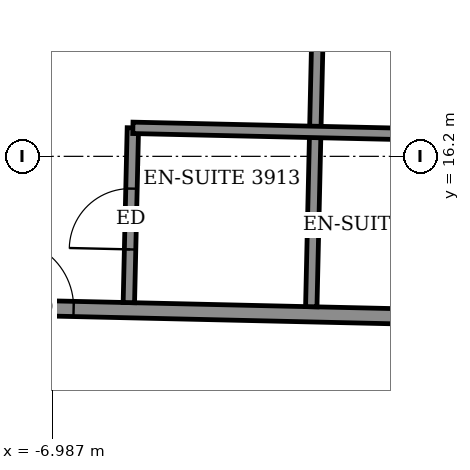
"""IFC4 building model, lengths in metres.
Left out: names, types, materials, properties, quantities, classifications, styles, units other than length and angle.
Written with IfcOpenShell. Run it as: python <this file> out.ifc"""

import sys

from ifc_helpers import new_model, si_unit, direction, frame, frame_2d, origin, place, context, subcontext, project, spatial, rectangle, extrude, element, fill, save


model = new_model("IFC4")
c1 = context("Model", 3, precision=1e-05, world=origin(), true_north=direction((0.0, 1.0)))
c2 = subcontext(c1, "Body", "Model", "MODEL_VIEW")
j1 = project(units=[si_unit("LENGTHUNIT", "METRE"), si_unit("PLANEANGLEUNIT", "RADIAN")], contexts=[c1])
p1 = place(None, origin())
s1 = spatial("IfcSite", under=j1, at=p1, CompositionType="ELEMENT")
p2 = place(p1, origin())
s2 = spatial("IfcBuilding", under=s1, at=p2, CompositionType="ELEMENT")
p3 = place(p2, frame((0.0, 0.0, 156.3)))
s3 = spatial("IfcBuildingStorey", under=s2, at=p3, CompositionType="ELEMENT", Elevation=156.3)
p4 = place(p3, frame((-21.279, 14.523, 0.0), z_axis=(0.0, 0.0, 1.0), x_axis=(0.999742669174, -0.02268469602, 0.0)))
e1 = element("IfcWall", 1, at=p4, inside=s3, PredefinedType="PARTITIONING", context=c2, shape_type="SweptSolid", body=[
    extrude(rectangle(XDim=40.639, YDim=0.2, at=frame_2d((20.319, 0.0))), origin(), (0.0, 0.0, 1.0), 3.05),
])
p5 = place(p4, frame((37.65, 0.0, 0.0)))
e2 = element("IfcOpeningElement", 2, at=p5, cuts=e1, PredefinedType="OPENING", context=c2, shape_type="SweptSolid", body=[
    extrude(rectangle(XDim=0.9, YDim=2.1, at=frame_2d((0.45, 1.05))), frame((0.0, 0.11, 0.0), z_axis=(0.0, -1.0, 0.0), x_axis=(1.0, 0.0, 0.0)), (0.0, 0.0, 1.0), 0.22),
])
p6 = place(p4, frame((32.775, 0.0, 0.0)))
e3 = element("IfcOpeningElement", 3, at=p6, cuts=e1, PredefinedType="OPENING", context=c2, shape_type="SweptSolid", body=[
    extrude(rectangle(XDim=0.9, YDim=2.1, at=frame_2d((0.45, 1.05))), frame((0.0, 0.11, 0.0), z_axis=(0.0, -1.0, 0.0), x_axis=(1.0, 0.0, 0.0)), (0.0, 0.0, 1.0), 0.22),
])
p7 = place(p4, frame((30.4, 0.0, 0.0)))
e4 = element("IfcOpeningElement", 4, at=p7, cuts=e1, PredefinedType="OPENING", context=c2, shape_type="SweptSolid", body=[
    extrude(rectangle(XDim=0.9, YDim=2.1, at=frame_2d((0.45, 1.05))), frame((0.0, 0.11, 0.0), z_axis=(0.0, -1.0, 0.0), x_axis=(1.0, 0.0, 0.0)), (0.0, 0.0, 1.0), 0.22),
])
p8 = place(p4, frame((23.225, 0.0, 0.0)))
e5 = element("IfcOpeningElement", 5, at=p8, cuts=e1, PredefinedType="OPENING", context=c2, shape_type="SweptSolid", body=[
    extrude(rectangle(XDim=0.9, YDim=2.1, at=frame_2d((0.45, 1.05))), frame((0.0, 0.11, 0.0), z_axis=(0.0, -1.0, 0.0), x_axis=(1.0, 0.0, 0.0)), (0.0, 0.0, 1.0), 0.22),
])
p9 = place(p4, frame((20.85, 0.0, 0.0)))
e6 = element("IfcOpeningElement", 6, at=p9, cuts=e1, PredefinedType="OPENING", context=c2, shape_type="SweptSolid", body=[
    extrude(rectangle(XDim=0.9, YDim=2.1, at=frame_2d((0.45, 1.05))), frame((0.0, 0.11, 0.0), z_axis=(0.0, -1.0, 0.0), x_axis=(1.0, 0.0, 0.0)), (0.0, 0.0, 1.0), 0.22),
])
p10 = place(p4, frame((13.675, 0.0, 0.0)))
e7 = element("IfcOpeningElement", 7, at=p10, cuts=e1, PredefinedType="OPENING", context=c2, shape_type="SweptSolid", body=[
    extrude(rectangle(XDim=0.9, YDim=2.1, at=frame_2d((0.45, 1.05))), frame((0.0, 0.11, 0.0), z_axis=(0.0, -1.0, 0.0), x_axis=(1.0, 0.0, 0.0)), (0.0, 0.0, 1.0), 0.22),
])
p11 = place(p4, frame((11.325, 0.0, 0.0)))
e8 = element("IfcOpeningElement", 8, at=p11, cuts=e1, PredefinedType="OPENING", context=c2, shape_type="SweptSolid", body=[
    extrude(rectangle(XDim=0.9, YDim=2.1, at=frame_2d((0.45, 1.05))), frame((0.0, 0.11, 0.0), z_axis=(0.0, -1.0, 0.0), x_axis=(1.0, 0.0, 0.0)), (0.0, 0.0, 1.0), 0.22),
])
p12 = place(p4, frame((1.6, 0.0, 0.0)))
e9 = element("IfcOpeningElement", 9, at=p12, cuts=e1, PredefinedType="OPENING", context=c2, shape_type="SweptSolid", body=[
    extrude(rectangle(XDim=1.0, YDim=2.1, at=frame_2d((0.5, 1.05))), frame((0.0, 0.11, 0.0), z_axis=(0.0, -1.0, 0.0), x_axis=(1.0, 0.0, 0.0)), (0.0, 0.0, 1.0), 0.22),
])
p13 = place(p4, frame((6.55, 0.0, 0.0)))
e10 = element("IfcOpeningElement", 10, at=p13, cuts=e1, PredefinedType="OPENING", context=c2, shape_type="SweptSolid", body=[
    extrude(rectangle(XDim=0.9, YDim=2.1, at=frame_2d((0.45, 1.05))), frame((0.0, 0.11, 0.0), z_axis=(0.0, -1.0, 0.0), x_axis=(1.0, 0.0, 0.0)), (0.0, 0.0, 1.0), 0.22),
])
p14 = place(p3, frame((-5.981, 14.276, 0.0), z_axis=(0.0, 0.0, 1.0), x_axis=(0.023037316498, 0.999734605807, 0.0)))
e11 = element("IfcWall", 11, at=p14, inside=s3, PredefinedType="PARTITIONING", context=c2, shape_type="SweptSolid", body=[
    extrude(rectangle(XDim=2.3, YDim=0.15, at=frame_2d((1.15, 0.0))), origin(), (0.0, 0.0, 1.0), 3.05),
])
p15 = place(p14, frame((0.7, 0.0, 0.0)))
e12 = element("IfcOpeningElement", 12, at=p15, cuts=e11, PredefinedType="OPENING", context=c2, shape_type="SweptSolid", body=[
    extrude(rectangle(XDim=0.8, YDim=2.1, at=frame_2d((0.4, 1.05))), frame((0.0, 0.085, 0.0), z_axis=(0.0, -1.0, 0.0), x_axis=(1.0, 0.0, 0.0)), (0.0, 0.0, 1.0), 0.17),
])
p16 = place(p3, frame((-3.581, 14.222, 0.0), z_axis=(0.0, 0.0, 1.0), x_axis=(0.022688785847, 0.999742576365, 0.0)))
e13 = element("IfcWall", 13, at=p16, inside=s3, PredefinedType="PARTITIONING", context=c2, shape_type="SweptSolid", body=[
    extrude(rectangle(XDim=5.95, YDim=0.15, at=frame_2d((2.975, 0.0))), origin(), (0.0, 0.0, 1.0), 2.55),
])
p17 = place(p3, frame((-5.928, 16.575, 0.0), z_axis=(0.0, 0.0, 1.0), x_axis=(0.999747191239, -0.022484519337, 0.0)))
e14 = element("IfcWall", 14, at=p17, inside=s3, PredefinedType="PARTITIONING", context=c2, shape_type="SweptSolid", body=[
    extrude(rectangle(XDim=4.799, YDim=0.15, at=frame_2d((2.4, 0.0))), origin(), (0.0, 0.0, 1.0), 3.05),
])
p18 = place(p10, origin())
e15 = element("IfcDoor", 15, at=p18, inside=s3, OperationType="SINGLE_SWING_LEFT", PredefinedType="DOOR", context=c2, shape_type="SweptSolid", body=[
    extrude(rectangle(XDim=0.9, YDim=2.1, at=frame_2d((0.45, 1.05))), frame((0.0, 0.025, 0.0), z_axis=(0.0, -1.0, 0.0), x_axis=(1.0, 0.0, 0.0)), (0.0, 0.0, 1.0), 0.05),
])
fill(e7, e15)
p19 = place(p15, origin())
e16 = element("IfcDoor", 16, at=p19, inside=s3, OperationType="SINGLE_SWING_LEFT", PredefinedType="DOOR", context=c2, shape_type="SweptSolid", body=[
    extrude(rectangle(XDim=0.8, YDim=2.1, at=frame_2d((0.4, 1.05))), frame((0.0, 0.025, 0.0), z_axis=(0.0, -1.0, 0.0), x_axis=(1.0, 0.0, 0.0)), (0.0, 0.0, 1.0), 0.05),
])
fill(e12, e16)
save(model, sys.argv[1])
